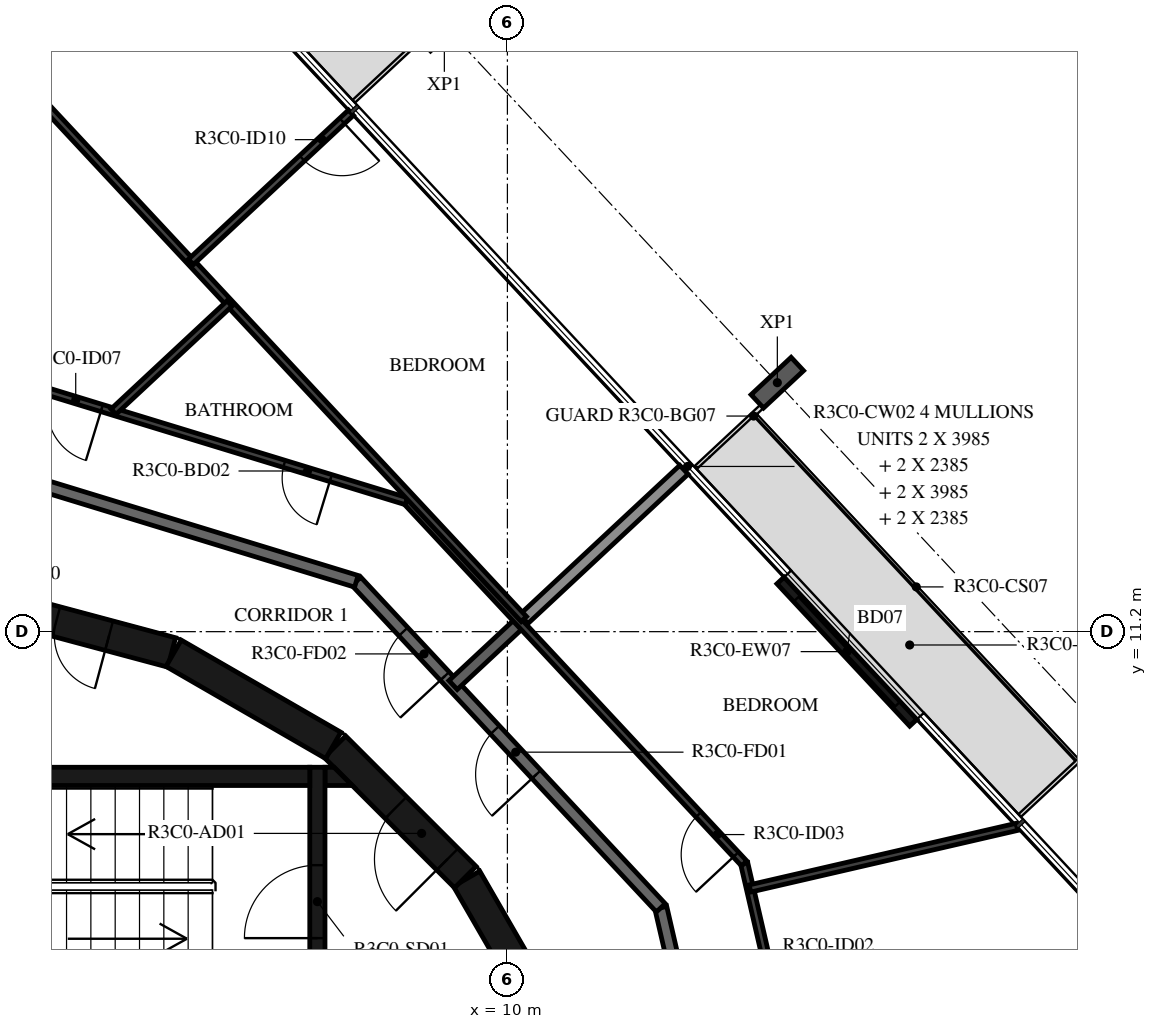
"""IFC4 building model, lengths in metres.
Left out: names, types, materials, properties, quantities, classifications, styles, units other than length and angle.
Written with IfcOpenShell. Run it as: python <this file> out.ifc"""

import sys

from ifc_helpers import new_model, si_unit, direction, frame, frame_2d, origin, origin_2d, place, context, subcontext, project, spatial, polyline, rectangle, i_section, outline, extrude, element, fill, save


model = new_model("IFC4")
c1 = context("Model", 3, precision=1e-05, world=origin(), true_north=direction((0.0, 1.0)))
c2 = subcontext(c1, "Body", "Model", "MODEL_VIEW")
j1 = project(units=[si_unit("LENGTHUNIT", "METRE"), si_unit("PLANEANGLEUNIT", "RADIAN")], contexts=[c1])
p1 = place(None, origin())
s1 = spatial("IfcSite", under=j1, at=p1, CompositionType="ELEMENT")
p2 = place(p1, origin())
s2 = spatial("IfcBuilding", under=s1, at=p2, CompositionType="ELEMENT")
p3 = place(p2, frame((0.0, 0.0, 134.4)))
s3 = spatial("IfcBuildingStorey", under=s2, at=p3, CompositionType="ELEMENT", Elevation=134.4)
p4 = place(p3, frame((14.439, 15.294, -0.38), z_axis=(0.0, 0.0, 1.0), x_axis=(0.68199801865, -0.731354019992, 0.0)))
e1 = element("IfcColumn", 1, at=p4, inside=s3, PredefinedType="COLUMN", context=c2, shape_type="SweptSolid", body=[
    extrude(i_section(OverallWidth=0.3, OverallDepth=0.9, WebThickness=0.019, FlangeThickness=0.035, FilletRadius=0.03, at=origin_2d()), origin(), (0.0, 0.0, 1.0), 3.5),
])
p5 = place(p3, frame((16.674, 9.701, 0.0), z_axis=(0.0, 0.0, 1.0), x_axis=(-0.681994703002, 0.731357111866, 0.0)))
e2 = element("IfcWall", 2, at=p5, inside=s3, PredefinedType="STANDARD", context=c2, shape_type="SweptSolid", body=[
    extrude(rectangle(XDim=3.2, YDim=0.16, at=frame_2d((1.6, 0.0))), origin(), (0.0, 0.0, 1.0), 3.12),
])
p6 = place(p5, frame((0.4, 0.0, 0.0)))
e3 = element("IfcOpeningElement", 3, at=p6, cuts=e2, PredefinedType="OPENING", context=c2, shape_type="SweptSolid", body=[
    extrude(rectangle(XDim=2.4, YDim=2.4, at=frame_2d((1.2, 1.2))), frame((0.0, 0.09, 0.0), z_axis=(0.0, -1.0, 0.0), x_axis=(1.0, 0.0, 0.0)), (0.0, 0.0, 1.0), 0.18),
])
p7 = place(p3, frame((10.845, 4.51, 0.0), z_axis=(0.0, 0.0, 1.0), x_axis=(-0.500087131594, 0.865975092491, 0.0)))
e4 = element("IfcWall", 4, at=p7, inside=s3, PredefinedType="SHEAR", context=c2, shape_type="SweptSolid", body=[
    extrude(rectangle(XDim=3.033, YDim=0.5, at=frame_2d((1.516, 0.0))), origin(), (0.0, 0.0, 1.0), 3.12),
])
p8 = place(p3, frame((9.308, 7.164, 0.0), z_axis=(0.0, 0.0, 1.0), x_axis=(-0.707106781187, 0.707106781187, 0.0)))
e5 = element("IfcWall", 5, at=p8, inside=s3, PredefinedType="SHEAR", context=c2, shape_type="SweptSolid", body=[
    extrude(rectangle(XDim=3.032, YDim=0.5, at=frame_2d((1.516, 0.0))), origin(), (0.0, 0.0, 1.0), 3.12),
])
p9 = place(p8, frame((0.416, 0.0, 0.0)))
e6 = element("IfcOpeningElement", 6, at=p9, cuts=e5, PredefinedType="OPENING", context=c2, shape_type="SweptSolid", body=[
    extrude(rectangle(XDim=1.2, YDim=2.1, at=frame_2d((0.6, 1.05))), frame((0.0, 0.26, 0.0), z_axis=(0.0, -1.0, 0.0), x_axis=(1.0, 0.0, 0.0)), (0.0, 0.0, 1.0), 0.52),
])
p10 = place(p3, frame((7.137, 9.329, 0.0), z_axis=(0.0, 0.0, 1.0), x_axis=(-0.865975092491, 0.500087131594, 0.0)))
e7 = element("IfcWall", 7, at=p10, inside=s3, PredefinedType="SHEAR", context=c2, shape_type="SweptSolid", body=[
    extrude(rectangle(XDim=3.033, YDim=0.5, at=frame_2d((1.516, 0.0))), origin(), (0.0, 0.0, 1.0), 3.12),
])
p11 = place(p3, frame((4.479, 10.858, 0.0), z_axis=(0.0, 0.0, 1.0), x_axis=(-0.965948410781, 0.258734743916, 0.0)))
e8 = element("IfcWall", 8, at=p11, inside=s3, PredefinedType="SHEAR", context=c2, shape_type="SweptSolid", body=[
    extrude(rectangle(XDim=3.033, YDim=0.5, at=frame_2d((1.516, 0.0))), origin(), (0.0, 0.0, 1.0), 3.12),
])
p12 = place(p11, frame((1.066, 0.0, 0.0)))
e9 = element("IfcOpeningElement", 9, at=p12, cuts=e8, PredefinedType="OPENING", context=c2, shape_type="SweptSolid", body=[
    extrude(rectangle(XDim=0.9, YDim=2.1, at=frame_2d((0.45, 1.05))), frame((0.0, 0.26, 0.0), z_axis=(0.0, -1.0, 0.0), x_axis=(1.0, 0.0, 0.0)), (0.0, 0.0, 1.0), 0.52),
])
p13 = place(p3, frame((0.0, 8.82, 0.0), z_axis=(0.0, 0.0, 1.0), x_axis=(1.0, 0.0, 0.0)))
e10 = element("IfcWall", 10, at=p13, inside=s3, PredefinedType="SHEAR", context=c2, shape_type="SweptSolid", body=[
    extrude(rectangle(XDim=6.75, YDim=0.3, at=frame_2d((3.375, 0.0))), origin(), (0.0, 0.0, 1.0), 3.12),
])
p14 = place(p3, frame((6.875, 5.05, 0.0), z_axis=(0.0, 0.0, 1.0), x_axis=(0.0, 1.0, 0.0)))
e11 = element("IfcWall", 11, at=p14, inside=s3, PredefinedType="SHEAR", context=c2, shape_type="SweptSolid", body=[
    extrude(rectangle(XDim=3.92, YDim=0.25, at=frame_2d((1.96, 0.0))), origin(), (0.0, 0.0, 1.0), 3.12),
])
p15 = place(p14, frame((1.11, 0.0, 0.0)))
e12 = element("IfcOpeningElement", 12, at=p15, cuts=e11, PredefinedType="OPENING", context=c2, shape_type="SweptSolid", body=[
    extrude(rectangle(XDim=1.2, YDim=2.1, at=frame_2d((0.6, 1.05))), frame((0.0, 0.135, 0.0), z_axis=(0.0, -1.0, 0.0), x_axis=(1.0, 0.0, 0.0)), (0.0, 0.0, 1.0), 0.27),
])
p16 = place(p3, origin())
e13 = element("IfcWall", 13, at=p16, inside=s3, PredefinedType="SHEAR", context=c2, shape_type="SweptSolid", body=[
    extrude(outline(polyline([(7.448, 8.67), (7.0, 8.67), (7.0, 8.97), (7.148, 8.97), (7.448, 8.67)])), origin(), (0.0, 0.0, 1.0), 3.12),
])
p17 = place(p3, frame((14.175, -0.495, 0.0), z_axis=(0.0, 0.0, 1.0), x_axis=(-0.224922649383, 0.974376622151, 0.0)))
e14 = element("IfcWall", 14, at=p17, inside=s3, PredefinedType="STANDARD", context=c2, shape_type="SweptSolid", body=[
    extrude(rectangle(XDim=7.342, YDim=0.2, at=frame_2d((3.671, 0.0))), origin(), (0.0, 0.0, 1.0), 3.12),
])
p18 = place(p3, frame((12.523, 6.659, 0.0), z_axis=(0.0, 0.0, 1.0), x_axis=(-0.682001841105, 0.731350455479, 0.0)))
e15 = element("IfcWall", 15, at=p18, inside=s3, PredefinedType="STANDARD", context=c2, shape_type="SweptSolid", body=[
    extrude(rectangle(XDim=7.342, YDim=0.2, at=frame_2d((3.671, 0.0))), origin(), (0.0, 0.0, 1.0), 3.12),
])
p19 = place(p18, frame((3.0, 0.0, 0.0)))
e16 = element("IfcOpeningElement", 16, at=p19, cuts=e15, PredefinedType="OPENING", context=c2, shape_type="SweptSolid", body=[
    extrude(rectangle(XDim=1.0, YDim=2.1, at=frame_2d((0.5, 1.05))), frame((0.0, 0.11, 0.0), z_axis=(0.0, -1.0, 0.0), x_axis=(1.0, 0.0, 0.0)), (0.0, 0.0, 1.0), 0.22),
])
p20 = place(p18, frame((5.209, 0.0, 0.0)))
e17 = element("IfcOpeningElement", 17, at=p20, cuts=e15, PredefinedType="OPENING", context=c2, shape_type="SweptSolid", body=[
    extrude(rectangle(XDim=1.0, YDim=2.1, at=frame_2d((0.5, 1.05))), frame((0.0, 0.11, 0.0), z_axis=(0.0, -1.0, 0.0), x_axis=(1.0, 0.0, 0.0)), (0.0, 0.0, 1.0), 0.22),
])
p21 = place(p3, frame((7.516, 12.028, 0.0), z_axis=(0.0, 0.0, 1.0), x_axis=(-0.956306642771, 0.292365533182, 0.0)))
e18 = element("IfcWall", 18, at=p21, inside=s3, PredefinedType="STANDARD", context=c2, shape_type="SweptSolid", body=[
    extrude(rectangle(XDim=7.342, YDim=0.2, at=frame_2d((3.671, 0.0))), origin(), (0.0, 0.0, 1.0), 3.12),
])
p22 = place(p3, frame((10.233, 11.372, 0.0), z_axis=(0.0, 0.0, 1.0), x_axis=(-0.731329353292, -0.682024469513, 0.0)))
e19 = element("IfcWall", 19, at=p22, inside=s3, PredefinedType="STANDARD", context=c2, shape_type="SweptSolid", body=[
    extrude(rectangle(XDim=1.54, YDim=0.2, at=frame_2d((0.77, 0.0))), origin(), (0.0, 0.0, 1.0), 3.12),
])
p23 = place(p3, frame((12.903, 13.862, 0.0), z_axis=(0.0, 0.0, 1.0), x_axis=(-0.731328084739, -0.682025829769, 0.0)))
e20 = element("IfcWall", 20, at=p23, inside=s3, PredefinedType="STANDARD", context=c2, shape_type="SweptSolid", body=[
    extrude(rectangle(XDim=3.6, YDim=0.2, at=frame_2d((1.8, 0.0))), origin(), (0.0, 0.0, 1.0), 2.73),
])
p24 = place(p3, frame((15.727, -0.549, 0.0), z_axis=(0.0, 0.0, 1.0), x_axis=(-0.22493611855, 0.974373512864, 0.0)))
e21 = element("IfcWall", 21, at=p24, inside=s3, PredefinedType="PARTITIONING", context=c2, shape_type="SweptSolid", body=[
    extrude(rectangle(XDim=8.146, YDim=0.12, at=frame_2d((4.073, 0.0))), origin(), (0.0, 0.0, 1.0), 3.12),
])
p25 = place(p24, frame((5.327, 0.0, 0.0)))
e22 = element("IfcOpeningElement", 22, at=p25, cuts=e21, PredefinedType="OPENING", context=c2, shape_type="SweptSolid", body=[
    extrude(rectangle(XDim=0.9, YDim=2.1, at=frame_2d((0.45, 1.05))), frame((0.0, 0.07, 0.0), z_axis=(0.0, -1.0, 0.0), x_axis=(1.0, 0.0, 0.0)), (0.0, 0.0, 1.0), 0.14),
])
p26 = place(p3, frame((13.894, 7.388, 0.0), z_axis=(0.0, 0.0, 1.0), x_axis=(-0.681994622729, 0.731357186721, 0.0)))
e23 = element("IfcWall", 23, at=p26, inside=s3, PredefinedType="PARTITIONING", context=c2, shape_type="SweptSolid", body=[
    extrude(rectangle(XDim=8.146, YDim=0.12, at=frame_2d((4.073, 0.0))), origin(), (0.0, 0.0, 1.0), 3.12),
])
p27 = place(p26, frame((0.2, 0.0, 0.0)))
e24 = element("IfcOpeningElement", 24, at=p27, cuts=e23, PredefinedType="OPENING", context=c2, shape_type="SweptSolid", body=[
    extrude(rectangle(XDim=0.9, YDim=2.1, at=frame_2d((0.45, 1.05))), frame((0.0, 0.07, 0.0), z_axis=(0.0, -1.0, 0.0), x_axis=(1.0, 0.0, 0.0)), (0.0, 0.0, 1.0), 0.14),
])
p28 = place(p3, frame((18.379, 7.99, 0.0), z_axis=(0.0, 0.0, 1.0), x_axis=(-0.974372926515, -0.224938658471, 0.0)))
e25 = element("IfcWall", 25, at=p28, inside=s3, PredefinedType="PARTITIONING", context=c2, shape_type="SweptSolid", body=[
    extrude(rectangle(XDim=4.505, YDim=0.12, at=frame_2d((2.253, 0.0))), origin(), (0.0, 0.0, 1.0), 3.12),
])
p29 = place(p3, frame((8.339, 13.345, 0.0), z_axis=(0.0, 0.0, 1.0), x_axis=(-0.956310145342, 0.292354076276, 0.0)))
e26 = element("IfcWall", 26, at=p29, inside=s3, PredefinedType="PARTITIONING", context=c2, shape_type="SweptSolid", body=[
    extrude(rectangle(XDim=8.146, YDim=0.12, at=frame_2d((4.073, 0.0))), origin(), (0.0, 0.0, 1.0), 3.12),
])
p30 = place(p29, frame((1.3, 0.0, 0.0)))
e27 = element("IfcOpeningElement", 27, at=p30, cuts=e26, PredefinedType="OPENING", context=c2, shape_type="SweptSolid", body=[
    extrude(rectangle(XDim=0.8, YDim=2.1, at=frame_2d((0.4, 1.05))), frame((0.0, 0.07, 0.0), z_axis=(0.0, -1.0, 0.0), x_axis=(1.0, 0.0, 0.0)), (0.0, 0.0, 1.0), 0.14),
])
p31 = place(p29, frame((5.237, 0.0, 0.0)))
e28 = element("IfcOpeningElement", 28, at=p31, cuts=e26, PredefinedType="OPENING", context=c2, shape_type="SweptSolid", body=[
    extrude(rectangle(XDim=0.9, YDim=2.1, at=frame_2d((0.45, 1.05))), frame((0.0, 0.07, 0.0), z_axis=(0.0, -1.0, 0.0), x_axis=(1.0, 0.0, 0.0)), (0.0, 0.0, 1.0), 0.14),
])
p32 = place(p3, frame((-1.539, 24.071, 0.0), z_axis=(0.0, 0.0, 1.0), x_axis=(0.68200220595, -0.731350115252, 0.0)))
e29 = element("IfcWall", 29, at=p32, inside=s3, PredefinedType="PARTITIONING", context=c2, shape_type="SweptSolid", body=[
    extrude(rectangle(XDim=17.316, YDim=0.12, at=frame_2d((8.658, 0.0))), origin(), (0.0, 0.0, 1.0), 3.12),
])
p33 = place(p32, frame((3.323, 0.0, 0.0)))
e30 = element("IfcOpeningElement", 30, at=p33, cuts=e29, PredefinedType="OPENING", context=c2, shape_type="SweptSolid", body=[
    extrude(rectangle(XDim=0.9, YDim=2.1, at=frame_2d((0.45, 1.05))), frame((0.0, 0.07, 0.0), z_axis=(0.0, -1.0, 0.0), x_axis=(1.0, 0.0, 0.0)), (0.0, 0.0, 1.0), 0.14),
])
p34 = place(p32, frame((0.2, 0.0, 0.0)))
e31 = element("IfcOpeningElement", 31, at=p34, cuts=e29, PredefinedType="OPENING", context=c2, shape_type="SweptSolid", body=[
    extrude(rectangle(XDim=0.9, YDim=2.1, at=frame_2d((0.45, 1.05))), frame((0.0, 0.07, 0.0), z_axis=(0.0, -1.0, 0.0), x_axis=(1.0, 0.0, 0.0)), (0.0, 0.0, 1.0), 0.14),
])
p35 = place(p3, frame((7.427, 19.734, 0.0), z_axis=(0.0, 0.0, 1.0), x_axis=(-0.73139345201, -0.681955730497, 0.0)))
e32 = element("IfcWall", 32, at=p35, inside=s3, PredefinedType="PARTITIONING", context=c2, shape_type="SweptSolid", body=[
    extrude(rectangle(XDim=3.6, YDim=0.12, at=frame_2d((1.8, 0.0))), origin(), (0.0, 0.0, 1.0), 2.73),
])
p36 = place(p35, frame((0.2, 0.0, 0.0)))
e33 = element("IfcOpeningElement", 33, at=p36, cuts=e32, PredefinedType="OPENING", context=c2, shape_type="SweptSolid", body=[
    extrude(rectangle(XDim=0.9, YDim=2.1, at=frame_2d((0.45, 1.05))), frame((0.0, 0.07, 0.0), z_axis=(0.0, -1.0, 0.0), x_axis=(1.0, 0.0, 0.0)), (0.0, 0.0, 1.0), 0.14),
])
p37 = place(p3, frame((5.431, 16.597, 0.0), z_axis=(0.0, 0.0, 1.0), x_axis=(-0.731378807316, -0.681971436505, 0.0)))
e34 = element("IfcWall", 34, at=p37, inside=s3, PredefinedType="PARTITIONING", context=c2, shape_type="SweptSolid", body=[
    extrude(rectangle(XDim=2.609, YDim=0.12, at=frame_2d((1.305, 0.0))), origin(), (0.0, 0.0, 1.0), 3.12),
])
p38 = place(p6, origin())
e35 = element("IfcDoor", 35, at=p38, inside=s3, OperationType="DOUBLE_DOOR_SLIDING", PredefinedType="DOOR", context=c2, shape_type="SweptSolid", body=[
    extrude(rectangle(XDim=2.4, YDim=2.4, at=frame_2d((1.2, 1.2))), frame((0.0, 0.025, 0.0), z_axis=(0.0, -1.0, 0.0), x_axis=(1.0, 0.0, 0.0)), (0.0, 0.0, 1.0), 0.05),
])
fill(e3, e35)
p39 = place(p15, origin())
e36 = element("IfcDoor", 36, at=p39, inside=s3, OperationType="SINGLE_SWING_LEFT", PredefinedType="DOOR", context=c2, shape_type="SweptSolid", body=[
    extrude(rectangle(XDim=1.2, YDim=2.1, at=frame_2d((0.6, 1.05))), frame((0.0, 0.025, 0.0), z_axis=(0.0, -1.0, 0.0), x_axis=(1.0, 0.0, 0.0)), (0.0, 0.0, 1.0), 0.05),
])
fill(e12, e36)
p40 = place(p9, origin())
e37 = element("IfcDoor", 37, at=p40, inside=s3, OperationType="SINGLE_SWING_RIGHT", PredefinedType="DOOR", context=c2, shape_type="SweptSolid", body=[
    extrude(rectangle(XDim=1.2, YDim=2.1, at=frame_2d((0.6, 1.05))), frame((0.0, 0.025, 0.0), z_axis=(0.0, -1.0, 0.0), x_axis=(1.0, 0.0, 0.0)), (0.0, 0.0, 1.0), 0.05),
])
fill(e6, e37)
p41 = place(p12, origin())
e38 = element("IfcDoor", 38, at=p41, inside=s3, OperationType="SINGLE_SWING_LEFT", PredefinedType="DOOR", context=c2, shape_type="SweptSolid", body=[
    extrude(rectangle(XDim=0.9, YDim=2.1, at=frame_2d((0.45, 1.05))), frame((0.0, 0.025, 0.0), z_axis=(0.0, -1.0, 0.0), x_axis=(1.0, 0.0, 0.0)), (0.0, 0.0, 1.0), 0.05),
])
fill(e9, e38)
p42 = place(p19, origin())
e39 = element("IfcDoor", 39, at=p42, inside=s3, OperationType="SINGLE_SWING_LEFT", PredefinedType="DOOR", context=c2, shape_type="SweptSolid", body=[
    extrude(rectangle(XDim=1.0, YDim=2.1, at=frame_2d((0.5, 1.05))), frame((0.0, 0.025, 0.0), z_axis=(0.0, -1.0, 0.0), x_axis=(1.0, 0.0, 0.0)), (0.0, 0.0, 1.0), 0.05),
])
fill(e16, e39)
p43 = place(p27, origin())
e40 = element("IfcDoor", 40, at=p43, inside=s3, OperationType="SINGLE_SWING_LEFT", PredefinedType="DOOR", context=c2, shape_type="SweptSolid", body=[
    extrude(rectangle(XDim=0.9, YDim=2.1, at=frame_2d((0.45, 1.05))), frame((0.0, 0.025, 0.0), z_axis=(0.0, -1.0, 0.0), x_axis=(1.0, 0.0, 0.0)), (0.0, 0.0, 1.0), 0.05),
])
fill(e24, e40)
p44 = place(p20, origin())
e41 = element("IfcDoor", 41, at=p44, inside=s3, OperationType="SINGLE_SWING_RIGHT", PredefinedType="DOOR", context=c2, shape_type="SweptSolid", body=[
    extrude(rectangle(XDim=1.0, YDim=2.1, at=frame_2d((0.5, 1.05))), frame((0.0, 0.025, 0.0), z_axis=(0.0, -1.0, 0.0), x_axis=(1.0, 0.0, 0.0)), (0.0, 0.0, 1.0), 0.05),
])
fill(e17, e41)
p45 = place(p30, origin())
e42 = element("IfcDoor", 42, at=p45, inside=s3, OperationType="SINGLE_SWING_RIGHT", PredefinedType="DOOR", context=c2, shape_type="SweptSolid", body=[
    extrude(rectangle(XDim=0.8, YDim=2.1, at=frame_2d((0.4, 1.05))), frame((0.0, 0.025, 0.0), z_axis=(0.0, -1.0, 0.0), x_axis=(1.0, 0.0, 0.0)), (0.0, 0.0, 1.0), 0.05),
])
fill(e27, e42)
p46 = place(p31, origin())
e43 = element("IfcDoor", 43, at=p46, inside=s3, OperationType="SINGLE_SWING_RIGHT", PredefinedType="DOOR", context=c2, shape_type="SweptSolid", body=[
    extrude(rectangle(XDim=0.9, YDim=2.1, at=frame_2d((0.45, 1.05))), frame((0.0, 0.025, 0.0), z_axis=(0.0, -1.0, 0.0), x_axis=(1.0, 0.0, 0.0)), (0.0, 0.0, 1.0), 0.05),
])
fill(e28, e43)
p47 = place(p36, origin())
e44 = element("IfcDoor", 44, at=p47, inside=s3, OperationType="SINGLE_SWING_LEFT", PredefinedType="DOOR", context=c2, shape_type="SweptSolid", body=[
    extrude(rectangle(XDim=0.9, YDim=2.1, at=frame_2d((0.45, 1.05))), frame((0.0, 0.025, 0.0), z_axis=(0.0, -1.0, 0.0), x_axis=(1.0, 0.0, 0.0)), (0.0, 0.0, 1.0), 0.05),
])
fill(e33, e44)
save(model, sys.argv[1])
